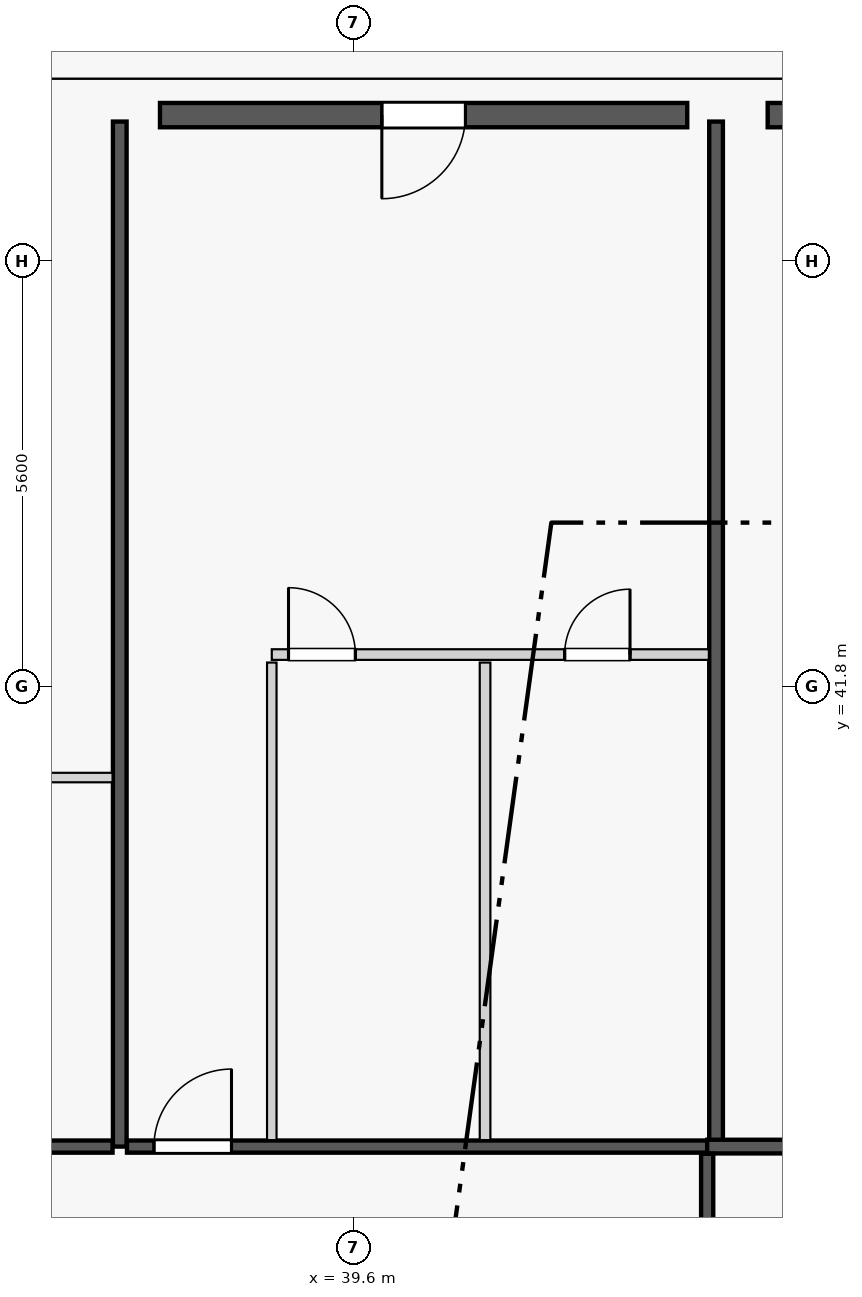
"""IFC4 building model, lengths in metres.
Left out: names, types, materials, properties, quantities, classifications, styles, units other than length and angle.
Written with IfcOpenShell. Run it as: python <this file> out.ifc"""

import sys

from ifc_helpers import new_model, si_unit, direction, frame, frame_2d, origin, origin_2d, place, context, subcontext, project, spatial, rectangle, extrude, element, fill, save


model = new_model("IFC4")
c1 = context("Model", 3, precision=1e-05, world=origin(), true_north=direction((0.0, 1.0)))
c2 = subcontext(c1, "Body", "Model", "MODEL_VIEW")
j1 = project(units=[si_unit("LENGTHUNIT", "METRE"), si_unit("PLANEANGLEUNIT", "RADIAN")], contexts=[c1])
p1 = place(None, origin())
s1 = spatial("IfcSite", under=j1, at=p1, CompositionType="ELEMENT")
p2 = place(p1, origin())
s2 = spatial("IfcBuilding", under=s1, at=p2, CompositionType="ELEMENT")
p3 = place(p2, frame((0.0, 0.0, 94.2)))
s3 = spatial("IfcBuildingStorey", under=s2, at=p3, CompositionType="ELEMENT", Elevation=94.2)
for number, where, z_axis, x_axis in (
    (1, (44.517, 49.311, 0.0), (0.0, 0.0, 1.0), (1.0, 0.0, 0.0)),
    (2, (36.522, 49.258, 0.0), (0.0, 0.0, 1.0), (1.0, 0.0, 0.0)),
):
    element("IfcColumn", number, at=place(p3, frame(where, z_axis=z_axis, x_axis=x_axis)), inside=s3, PredefinedType="COLUMN", context=c2, shape_type="SweptSolid", body=[
        extrude(rectangle(XDim=1.05, YDim=1.05, at=origin_2d()), origin(), (0.0, 0.0, 1.0), 4.2),
    ])
p4 = place(p3, frame((46.364, 49.32, 0.0), z_axis=(0.0, 0.0, 1.0), x_axis=(-1.0, 0.0, 0.0)))
e3 = element("IfcWall", 3, at=p4, inside=s3, PredefinedType="STANDARD", context=c2, shape_type="SweptSolid", body=[
    extrude(rectangle(XDim=1.318, YDim=0.32, at=frame_2d((0.659, 0.0))), origin(), (0.0, 0.0, 1.0), 3.99),
])
p5 = place(p4, frame((0.22, 0.0, 0.75)))
e4 = element("IfcOpeningElement", 4, at=p5, cuts=e3, PredefinedType="OPENING", context=c2, shape_type="SweptSolid", body=[
    extrude(rectangle(XDim=0.878, YDim=1.7, at=frame_2d((0.439, 0.85))), frame((0.0, 0.17, 0.0), z_axis=(0.0, -1.0, 0.0), x_axis=(1.0, 0.0, 0.0)), (0.0, 0.0, 1.0), 0.34),
])
p6 = place(p3, frame((43.988, 49.32, 0.0), z_axis=(0.0, 0.0, 1.0), x_axis=(-1.0, 0.0, 0.0)))
e5 = element("IfcWall", 5, at=p6, inside=s3, PredefinedType="STANDARD", context=c2, shape_type="SweptSolid", body=[
    extrude(rectangle(XDim=6.937, YDim=0.32, at=frame_2d((3.469, 0.0))), origin(), (0.0, 0.0, 1.0), 2.59),
])
p7 = place(p6, frame((2.918, 0.0, 0.0)))
e6 = element("IfcOpeningElement", 6, at=p7, cuts=e5, PredefinedType="OPENING", context=c2, shape_type="SweptSolid", body=[
    extrude(rectangle(XDim=1.1, YDim=2.25, at=frame_2d((0.55, 1.125))), frame((0.0, 0.17, 0.0), z_axis=(0.0, -1.0, 0.0), x_axis=(1.0, 0.0, 0.0)), (0.0, 0.0, 1.0), 0.34),
])
for number, where, z_axis, x_axis in (
    (7, (36.522, 35.75, 0.0), (0.0, 0.0, 1.0), (0.0, 1.0, 0.0)),
    (8, (44.367, 35.75, 0.0), (0.0, 0.0, 1.0), (0.0, 1.0, 0.0)),
):
    element("IfcWall", number, at=place(p3, frame(where, z_axis=z_axis, x_axis=x_axis)), inside=s3, PredefinedType="PARTITIONING", context=c2, shape_type="SweptSolid", body=[
        extrude(rectangle(XDim=13.485, YDim=0.18, at=frame_2d((6.743, 0.0))), origin(), (0.0, 0.0, 1.0), 2.59),
    ])
p8 = place(p3, frame((20.528, 35.75, 0.0), z_axis=(0.0, 0.0, 1.0), x_axis=(1.0, 0.0, 0.0)))
e9 = element("IfcWall", 9, at=p8, inside=s3, PredefinedType="PARTITIONING", context=c2, shape_type="SweptSolid", body=[
    extrude(rectangle(XDim=15.899, YDim=0.16, at=frame_2d((7.949, 0.0))), origin(), (0.0, 0.0, 1.0), 3.99),
])
p9 = place(p8, frame((0.572, 0.0, 0.0)))
e10 = element("IfcOpeningElement", 10, at=p9, cuts=e9, PredefinedType="OPENING", context=c2, shape_type="SweptSolid", body=[
    extrude(rectangle(XDim=1.35, YDim=2.35, at=frame_2d((0.675, 1.175))), frame((0.0, 0.09, 0.0), z_axis=(0.0, -1.0, 0.0), x_axis=(1.0, 0.0, 0.0)), (0.0, 0.0, 1.0), 0.18),
])
p10 = place(p3, frame((33.85, 40.605, 0.0), z_axis=(0.0, 0.0, 1.0), x_axis=(1.0, 0.0, 0.0)))
e11 = element("IfcWall", 11, at=p10, inside=s3, PredefinedType="PARTITIONING", context=c2, shape_type="SweptSolid", body=[
    extrude(rectangle(XDim=2.577, YDim=0.125, at=frame_2d((1.289, 0.0))), origin(), (0.0, 0.0, 1.0), 3.99),
])
p11 = place(p10, frame((0.863, 0.0, 0.0)))
e12 = element("IfcOpeningElement", 12, at=p11, cuts=e11, PredefinedType="OPENING", context=c2, shape_type="SweptSolid", body=[
    extrude(rectangle(XDim=0.86, YDim=2.1, at=frame_2d((0.43, 1.05))), frame((0.0, 0.073, 0.0), z_axis=(0.0, -1.0, 0.0), x_axis=(1.0, 0.0, 0.0)), (0.0, 0.0, 1.0), 0.145),
])
p12 = place(p3, frame((36.617, 35.75, 0.0), z_axis=(0.0, 0.0, 1.0), x_axis=(1.0, 0.0, 0.0)))
e13 = element("IfcWall", 13, at=p12, inside=s3, PredefinedType="PARTITIONING", context=c2, shape_type="SweptSolid", body=[
    extrude(rectangle(XDim=7.655, YDim=0.16, at=frame_2d((3.828, 0.0))), origin(), (0.0, 0.0, 1.0), 3.99),
])
p13 = place(p12, frame((0.355, 0.0, 0.0)))
e14 = element("IfcOpeningElement", 14, at=p13, cuts=e13, PredefinedType="OPENING", context=c2, shape_type="SweptSolid", body=[
    extrude(rectangle(XDim=1.02, YDim=2.25, at=frame_2d((0.51, 1.125))), frame((0.0, 0.09, 0.0), z_axis=(0.0, -1.0, 0.0), x_axis=(1.0, 0.0, 0.0)), (0.0, 0.0, 1.0), 0.18),
])
p14 = place(p3, frame((38.522, 35.835, 0.0), z_axis=(0.0, 0.0, 1.0), x_axis=(0.0, 1.0, 0.0)))
e15 = element("IfcWall", 15, at=p14, inside=s3, PredefinedType="PARTITIONING", context=c2, shape_type="SweptSolid", body=[
    extrude(rectangle(XDim=6.283, YDim=0.125, at=frame_2d((3.142, 0.0))), origin(), (0.0, 0.0, 1.0), 3.99),
])
p15 = place(p3, frame((38.522, 42.223, 0.0), z_axis=(0.0, 0.0, 1.0), x_axis=(1.0, 0.0, 0.0)))
e16 = element("IfcWall", 16, at=p15, inside=s3, PredefinedType="PLUMBINGWALL", context=c2, shape_type="SweptSolid", body=[
    extrude(rectangle(XDim=5.75, YDim=0.14, at=frame_2d((2.875, 0.0))), origin(), (0.0, 0.0, 1.0), 3.99),
])
p16 = place(p15, frame((3.853, 0.0, 0.0)))
e17 = element("IfcOpeningElement", 17, at=p16, cuts=e16, PredefinedType="OPENING", context=c2, shape_type="SweptSolid", body=[
    extrude(rectangle(XDim=0.86, YDim=2.1, at=frame_2d((0.43, 1.05))), frame((0.0, 0.08, 0.0), z_axis=(0.0, -1.0, 0.0), x_axis=(1.0, 0.0, 0.0)), (0.0, 0.0, 1.0), 0.16),
])
p17 = place(p15, frame((0.22, 0.0, 0.0)))
e18 = element("IfcOpeningElement", 18, at=p17, cuts=e16, PredefinedType="OPENING", context=c2, shape_type="SweptSolid", body=[
    extrude(rectangle(XDim=0.88, YDim=2.15, at=frame_2d((0.44, 1.075))), frame((0.0, 0.08, 0.0), z_axis=(0.0, -1.0, 0.0), x_axis=(1.0, 0.0, 0.0)), (0.0, 0.0, 1.0), 0.16),
])
p18 = place(p3, frame((41.328, 35.835, 0.0), z_axis=(0.0, 0.0, 1.0), x_axis=(0.0, 1.0, 0.0)))
e19 = element("IfcWall", 19, at=p18, inside=s3, PredefinedType="PLUMBINGWALL", context=c2, shape_type="SweptSolid", body=[
    extrude(rectangle(XDim=6.283, YDim=0.14, at=frame_2d((3.142, 0.0))), origin(), (0.0, 0.0, 1.0), 2.59),
])
p19 = place(p3, frame((44.25, 35.75, 0.0), z_axis=(0.0, 0.0, 1.0), x_axis=(1.0, 0.0, 0.0)))
e20 = element("IfcWall", 20, at=p19, inside=s3, PredefinedType="PARTITIONING", context=c2, shape_type="SweptSolid", body=[
    extrude(rectangle(XDim=9.947, YDim=0.18, at=frame_2d((4.974, 0.0))), origin(), (0.0, 0.0, 1.0), 3.99),
])
p20 = place(p3, frame((44.25, 16.295, 0.0), z_axis=(0.0, 0.0, 1.0), x_axis=(0.0, 1.0, 0.0)))
e21 = element("IfcWall", 21, at=p20, inside=s3, PredefinedType="PARTITIONING", context=c2, shape_type="SweptSolid", body=[
    extrude(rectangle(XDim=19.36, YDim=0.16, at=frame_2d((9.68, 0.0))), origin(), (0.0, 0.0, 1.0), 2.59),
])
p21 = place(p20, frame((0.45, 0.0, 0.0)))
e22 = element("IfcOpeningElement", 22, at=p21, cuts=e21, PredefinedType="OPENING", context=c2, shape_type="SweptSolid", body=[
    extrude(rectangle(XDim=1.02, YDim=2.25, at=frame_2d((0.51, 1.125))), frame((0.0, 0.09, 0.0), z_axis=(0.0, -1.0, 0.0), x_axis=(1.0, 0.0, 0.0)), (0.0, 0.0, 1.0), 0.18),
])
p22 = place(p7, origin())
e23 = element("IfcDoor", 23, at=p22, inside=s3, OperationType="SINGLE_SWING_RIGHT", PredefinedType="DOOR", context=c2, shape_type="SweptSolid", body=[
    extrude(rectangle(XDim=1.1, YDim=2.25, at=frame_2d((0.55, 1.125))), frame((0.0, 0.025, 0.0), z_axis=(0.0, -1.0, 0.0), x_axis=(1.0, 0.0, 0.0)), (0.0, 0.0, 1.0), 0.05),
])
fill(e6, e23)
p23 = place(p16, origin())
e24 = element("IfcDoor", 24, at=p23, inside=s3, OperationType="SINGLE_SWING_RIGHT", PredefinedType="DOOR", context=c2, shape_type="SweptSolid", body=[
    extrude(rectangle(XDim=0.86, YDim=2.1, at=frame_2d((0.43, 1.05))), frame((0.0, 0.025, 0.0), z_axis=(0.0, -1.0, 0.0), x_axis=(1.0, 0.0, 0.0)), (0.0, 0.0, 1.0), 0.05),
])
fill(e17, e24)
p24 = place(p13, origin())
e25 = element("IfcDoor", 25, at=p24, inside=s3, OperationType="SINGLE_SWING_RIGHT", PredefinedType="DOOR", context=c2, shape_type="SweptSolid", body=[
    extrude(rectangle(XDim=1.02, YDim=2.25, at=frame_2d((0.51, 1.125))), frame((0.0, 0.025, 0.0), z_axis=(0.0, -1.0, 0.0), x_axis=(1.0, 0.0, 0.0)), (0.0, 0.0, 1.0), 0.05),
])
fill(e14, e25)
p25 = place(p17, origin())
e26 = element("IfcDoor", 26, at=p25, inside=s3, OperationType="SINGLE_SWING_LEFT", PredefinedType="DOOR", context=c2, shape_type="SweptSolid", body=[
    extrude(rectangle(XDim=0.88, YDim=2.15, at=frame_2d((0.44, 1.075))), frame((0.0, 0.025, 0.0), z_axis=(0.0, -1.0, 0.0), x_axis=(1.0, 0.0, 0.0)), (0.0, 0.0, 1.0), 0.05),
])
fill(e18, e26)
save(model, sys.argv[1])
